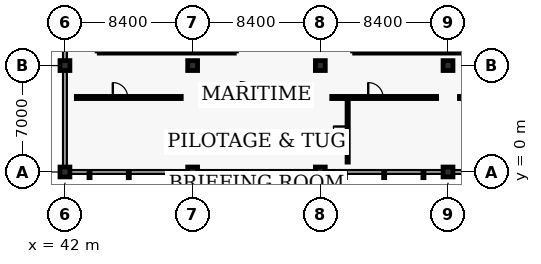
"""IFC4 building model, lengths in metres.
Left out: names, types, materials, properties, quantities, classifications, styles, units other than length and angle.
Written with IfcOpenShell. Run it as: python <this file> out.ifc"""

import sys

from ifc_helpers import new_model, si_unit, direction, frame, frame_2d, origin, origin_2d, place, context, subcontext, project, spatial, rectangle, extrude, element, fill, save


model = new_model("IFC4")
c1 = context("Model", 3, precision=1e-05, world=origin(), true_north=direction((0.0, 1.0)))
c2 = subcontext(c1, "Body", "Model", "MODEL_VIEW")
j1 = project(units=[si_unit("LENGTHUNIT", "METRE"), si_unit("PLANEANGLEUNIT", "RADIAN")], contexts=[c1])
p1 = place(None, origin())
s1 = spatial("IfcSite", under=j1, at=p1, CompositionType="ELEMENT")
p2 = place(p1, origin())
s2 = spatial("IfcBuilding", under=s1, at=p2, CompositionType="ELEMENT")
p3 = place(p2, frame((0.0, 0.0, 13.12)))
s3 = spatial("IfcBuildingStorey", under=s2, at=p3, CompositionType="ELEMENT", Elevation=13.12)
for number, where, z_axis, x_axis in (
    (1, (42.0, 0.0, 0.0), (0.0, 0.0, 1.0), (1.0, 0.0, 0.0)),
    (2, (42.0, 7.0, 0.0), (0.0, 0.0, 1.0), (1.0, 0.0, 0.0)),
    (3, (50.4, 0.0, 0.0), (0.0, 0.0, 1.0), (1.0, 0.0, 0.0)),
    (4, (50.4, 7.0, 0.0), (0.0, 0.0, 1.0), (1.0, 0.0, 0.0)),
    (5, (58.8, 0.0, 0.0), (0.0, 0.0, 1.0), (1.0, 0.0, 0.0)),
    (6, (58.8, 7.0, 0.0), (0.0, 0.0, 1.0), (1.0, 0.0, 0.0)),
    (7, (67.2, 0.0, 0.0), (0.0, 0.0, 1.0), (1.0, 0.0, 0.0)),
    (8, (67.2, 7.0, 0.0), (0.0, 0.0, 1.0), (1.0, 0.0, 0.0)),
):
    element("IfcColumn", number, at=place(p3, frame(where, z_axis=z_axis, x_axis=x_axis)), inside=s3, PredefinedType="COLUMN", context=c2, shape_type="SweptSolid", body=[
        extrude(rectangle(XDim=0.65, YDim=0.65, at=origin_2d()), origin(), (0.0, 0.0, 1.0), 3.2),
    ])
for number, where, z_axis, x_axis in (
    (9, (44.26, 7.96, 0.0), (0.0, 0.0, 1.0), (1.0, 0.0, 0.0)),
    (10, (61.06, 7.96, 0.0), (0.0, 0.0, 1.0), (1.0, 0.0, 0.0)),
):
    element("IfcWall", number, at=place(p3, frame(where, z_axis=z_axis, x_axis=x_axis)), inside=s3, PredefinedType="SHEAR", context=c2, shape_type="SweptSolid", body=[
        extrude(rectangle(XDim=8.88, YDim=0.28, at=frame_2d((4.44, 0.0))), origin(), (0.0, 0.0, 1.0), 3.2),
    ])
p4 = place(p3, frame((42.75, 4.9, 0.0), z_axis=(0.0, 0.0, 1.0), x_axis=(1.0, 0.0, 0.0)))
e11 = element("IfcWall", 11, at=p4, inside=s3, PredefinedType="PARTITIONING", context=c2, shape_type="SweptSolid", body=[
    extrude(rectangle(XDim=6.9, YDim=0.14, at=frame_2d((3.45, 0.0))), origin(), (0.0, 0.0, 1.0), 2.475),
])
p5 = place(p4, frame((2.4, 0.0, 0.0)))
e12 = element("IfcOpeningElement", 12, at=p5, cuts=e11, PredefinedType="OPENING", context=c2, shape_type="SweptSolid", body=[
    extrude(rectangle(XDim=0.98, YDim=2.12, at=frame_2d((0.49, 1.06))), frame((0.0, 0.08, 0.0), z_axis=(0.0, -1.0, 0.0), x_axis=(1.0, 0.0, 0.0)), (0.0, 0.0, 1.0), 0.16),
])
p6 = place(p3, frame((51.15, 4.9, 0.0), z_axis=(0.0, 0.0, 1.0), x_axis=(1.0, 0.0, 0.0)))
e13 = element("IfcWall", 13, at=p6, inside=s3, PredefinedType="PARTITIONING", context=c2, shape_type="SweptSolid", body=[
    extrude(rectangle(XDim=6.9, YDim=0.14, at=frame_2d((3.45, 0.0))), origin(), (0.0, 0.0, 1.0), 2.475),
])
p7 = place(p6, frame((2.4, 0.0, 0.0)))
e14 = element("IfcOpeningElement", 14, at=p7, cuts=e13, PredefinedType="OPENING", context=c2, shape_type="SweptSolid", body=[
    extrude(rectangle(XDim=1.04, YDim=2.14, at=frame_2d((0.52, 1.07))), frame((0.0, 0.08, 0.0), z_axis=(0.0, -1.0, 0.0), x_axis=(1.0, 0.0, 0.0)), (0.0, 0.0, 1.0), 0.16),
])
p8 = place(p3, frame((59.55, 4.9, 0.0), z_axis=(0.0, 0.0, 1.0), x_axis=(1.0, 0.0, 0.0)))
e15 = element("IfcWall", 15, at=p8, inside=s3, PredefinedType="PARTITIONING", context=c2, shape_type="SweptSolid", body=[
    extrude(rectangle(XDim=6.9, YDim=0.14, at=frame_2d((3.45, 0.0))), origin(), (0.0, 0.0, 1.0), 2.475),
])
p9 = place(p8, frame((2.4, 0.0, 0.0)))
e16 = element("IfcOpeningElement", 16, at=p9, cuts=e15, PredefinedType="OPENING", context=c2, shape_type="SweptSolid", body=[
    extrude(rectangle(XDim=0.98, YDim=2.12, at=frame_2d((0.49, 1.06))), frame((0.0, 0.08, 0.0), z_axis=(0.0, -1.0, 0.0), x_axis=(1.0, 0.0, 0.0)), (0.0, 0.0, 1.0), 0.16),
])
p10 = place(p3, frame((60.6, 0.65, 0.0), z_axis=(0.0, 0.0, 1.0), x_axis=(0.0, 1.0, 0.0)))
e17 = element("IfcWall", 17, at=p10, inside=s3, PredefinedType="PARTITIONING", context=c2, shape_type="SweptSolid", body=[
    extrude(rectangle(XDim=4.1, YDim=0.08, at=frame_2d((2.05, 0.0))), origin(), (0.0, 0.0, 1.0), 2.5),
])
p11 = place(p10, frame((1.4, 0.0, 0.0)))
e18 = element("IfcOpeningElement", 18, at=p11, cuts=e17, PredefinedType="OPENING", context=c2, shape_type="SweptSolid", body=[
    extrude(rectangle(XDim=0.94, YDim=2.08, at=frame_2d((0.47, 1.04))), frame((0.0, 0.05, 0.0), z_axis=(0.0, -1.0, 0.0), x_axis=(1.0, 0.0, 0.0)), (0.0, 0.0, 1.0), 0.1),
])
p12 = place(p3, frame((67.95, 4.9, 0.0), z_axis=(0.0, 0.0, 1.0), x_axis=(1.0, 0.0, 0.0)))
e19 = element("IfcWall", 19, at=p12, inside=s3, PredefinedType="PARTITIONING", context=c2, shape_type="SweptSolid", body=[
    extrude(rectangle(XDim=6.9, YDim=0.14, at=frame_2d((3.45, 0.0))), origin(), (0.0, 0.0, 1.0), 2.475),
])
p13 = place(p12, frame((2.4, 0.0, 0.0)))
e20 = element("IfcOpeningElement", 20, at=p13, cuts=e19, PredefinedType="OPENING", context=c2, shape_type="SweptSolid", body=[
    extrude(rectangle(XDim=1.04, YDim=2.14, at=frame_2d((0.52, 1.07))), frame((0.0, 0.08, 0.0), z_axis=(0.0, -1.0, 0.0), x_axis=(1.0, 0.0, 0.0)), (0.0, 0.0, 1.0), 0.16),
])
p14 = place(p5, origin())
e21 = element("IfcDoor", 21, at=p14, inside=s3, OperationType="SINGLE_SWING_LEFT", PredefinedType="DOOR", context=c2, shape_type="SweptSolid", body=[
    extrude(rectangle(XDim=0.98, YDim=2.12, at=frame_2d((0.49, 1.06))), frame((0.0, 0.025, 0.0), z_axis=(0.0, -1.0, 0.0), x_axis=(1.0, 0.0, 0.0)), (0.0, 0.0, 1.0), 0.05),
])
fill(e12, e21)
p15 = place(p7, origin())
e22 = element("IfcDoor", 22, at=p15, inside=s3, OperationType="SINGLE_SWING_LEFT", PredefinedType="DOOR", context=c2, shape_type="SweptSolid", body=[
    extrude(rectangle(XDim=1.04, YDim=2.14, at=frame_2d((0.52, 1.07))), frame((0.0, 0.025, 0.0), z_axis=(0.0, -1.0, 0.0), x_axis=(1.0, 0.0, 0.0)), (0.0, 0.0, 1.0), 0.05),
])
fill(e14, e22)
p16 = place(p9, origin())
e23 = element("IfcDoor", 23, at=p16, inside=s3, OperationType="SINGLE_SWING_LEFT", PredefinedType="DOOR", context=c2, shape_type="SweptSolid", body=[
    extrude(rectangle(XDim=0.98, YDim=2.12, at=frame_2d((0.49, 1.06))), frame((0.0, 0.025, 0.0), z_axis=(0.0, -1.0, 0.0), x_axis=(1.0, 0.0, 0.0)), (0.0, 0.0, 1.0), 0.05),
])
fill(e16, e23)
p17 = place(p11, origin())
e24 = element("IfcDoor", 24, at=p17, inside=s3, OperationType="SINGLE_SWING_RIGHT", PredefinedType="DOOR", context=c2, shape_type="SweptSolid", body=[
    extrude(rectangle(XDim=0.94, YDim=2.08, at=frame_2d((0.47, 1.04))), frame((0.0, 0.025, 0.0), z_axis=(0.0, -1.0, 0.0), x_axis=(1.0, 0.0, 0.0)), (0.0, 0.0, 1.0), 0.05),
])
fill(e18, e24)
save(model, sys.argv[1])
